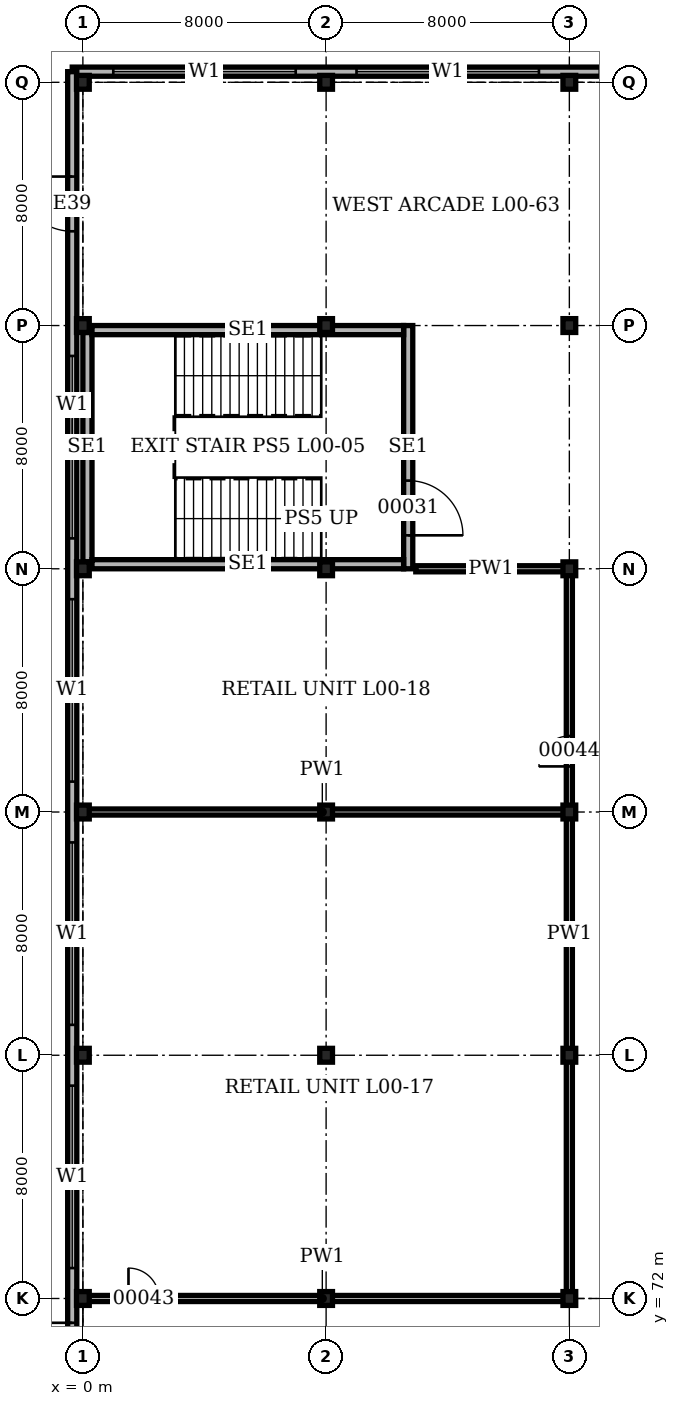
"""IFC4 building model, lengths in metres.
Left out: names, types, materials, properties, quantities, classifications, styles, units other than length and angle.
Written with IfcOpenShell. Run it as: python <this file> out.ifc"""

import sys

from ifc_helpers import new_model, si_unit, direction, frame, frame_2d, origin, origin_2d, place, context, subcontext, project, spatial, rectangle, i_section, extrude, element, fill, save


model = new_model("IFC4")
c1 = context("Model", 3, precision=1e-05, world=origin(), true_north=direction((0.0, 1.0)))
c2 = subcontext(c1, "Body", "Model", "MODEL_VIEW")
j1 = project(units=[si_unit("LENGTHUNIT", "METRE"), si_unit("PLANEANGLEUNIT", "RADIAN")], contexts=[c1])
p1 = place(None, origin())
s1 = spatial("IfcSite", under=j1, at=p1, CompositionType="ELEMENT")
p2 = place(p1, origin())
s2 = spatial("IfcBuilding", under=s1, at=p2, CompositionType="ELEMENT")
p3 = place(p2, origin())
s3 = spatial("IfcBuildingStorey", under=s2, at=p3, CompositionType="ELEMENT", Elevation=0.0)
for number, where, z_axis, x_axis in (
    (1, (0.0, 72.0, 0.0), (0.0, 0.0, 1.0), (1.0, 0.0, 0.0)),
    (2, (0.0, 80.0, 0.0), (0.0, 0.0, 1.0), (1.0, 0.0, 0.0)),
    (3, (0.0, 88.0, 0.0), (0.0, 0.0, 1.0), (1.0, 0.0, 0.0)),
    (4, (0.0, 96.0, 0.0), (0.0, 0.0, 1.0), (1.0, 0.0, 0.0)),
    (5, (0.0, 104.0, 0.0), (0.0, 0.0, 1.0), (1.0, 0.0, 0.0)),
    (6, (0.0, 112.0, 0.0), (0.0, 0.0, 1.0), (1.0, 0.0, 0.0)),
    (7, (8.0, 72.0, 0.0), (0.0, 0.0, 1.0), (1.0, 0.0, 0.0)),
    (8, (8.0, 80.0, 0.0), (0.0, 0.0, 1.0), (1.0, 0.0, 0.0)),
    (9, (8.0, 88.0, 0.0), (0.0, 0.0, 1.0), (1.0, 0.0, 0.0)),
    (10, (8.0, 96.0, 0.0), (0.0, 0.0, 1.0), (1.0, 0.0, 0.0)),
    (11, (8.0, 104.0, 0.0), (0.0, 0.0, 1.0), (1.0, 0.0, 0.0)),
    (12, (8.0, 112.0, 0.0), (0.0, 0.0, 1.0), (1.0, 0.0, 0.0)),
    (13, (16.0, 72.0, 0.0), (0.0, 0.0, 1.0), (1.0, 0.0, 0.0)),
    (14, (16.0, 80.0, 0.0), (0.0, 0.0, 1.0), (1.0, 0.0, 0.0)),
    (15, (16.0, 88.0, 0.0), (0.0, 0.0, 1.0), (1.0, 0.0, 0.0)),
    (16, (16.0, 96.0, 0.0), (0.0, 0.0, 1.0), (1.0, 0.0, 0.0)),
    (17, (16.0, 104.0, 0.0), (0.0, 0.0, 1.0), (1.0, 0.0, 0.0)),
    (18, (16.0, 112.0, 0.0), (0.0, 0.0, 1.0), (1.0, 0.0, 0.0)),
):
    element("IfcColumn", number, at=place(p3, frame(where, z_axis=z_axis, x_axis=x_axis)), inside=s3, PredefinedType="COLUMN", context=c2, shape_type="SweptSolid", body=[
        extrude(i_section(OverallWidth=0.419, OverallDepth=0.455, WebThickness=0.042, FlangeThickness=0.068, at=origin_2d()), origin(), (0.0, 0.0, 1.0), 4.9),
    ])
p4 = place(p3, frame((112.35, 112.35, 0.0), z_axis=(0.0, 0.0, 1.0), x_axis=(-1.0, 0.0, 0.0)))
e19 = element("IfcWall", 19, at=p4, inside=s3, PredefinedType="SOLIDWALL", context=c2, shape_type="SweptSolid", body=[
    extrude(rectangle(XDim=112.7, YDim=0.3, at=frame_2d((56.35, 0.0))), origin(), (0.0, 0.0, 1.0), 4.9),
])
p5 = place(p4, frame((1.35, 0.0, 1.2)))
e20 = element("IfcOpeningElement", 20, at=p5, cuts=e19, PredefinedType="OPENING", context=c2, shape_type="SweptSolid", body=[
    extrude(rectangle(XDim=6.0, YDim=1.5, at=frame_2d((3.0, 0.75))), frame((0.0, 0.16, 0.0), z_axis=(0.0, -1.0, 0.0), x_axis=(1.0, 0.0, 0.0)), (0.0, 0.0, 1.0), 0.32),
])
p6 = place(p4, frame((9.35, 0.0, 1.2)))
e21 = element("IfcOpeningElement", 21, at=p6, cuts=e19, PredefinedType="OPENING", context=c2, shape_type="SweptSolid", body=[
    extrude(rectangle(XDim=6.0, YDim=1.5, at=frame_2d((3.0, 0.75))), frame((0.0, 0.16, 0.0), z_axis=(0.0, -1.0, 0.0), x_axis=(1.0, 0.0, 0.0)), (0.0, 0.0, 1.0), 0.32),
])
p7 = place(p4, frame((17.35, 0.0, 1.2)))
e22 = element("IfcOpeningElement", 22, at=p7, cuts=e19, PredefinedType="OPENING", context=c2, shape_type="SweptSolid", body=[
    extrude(rectangle(XDim=6.0, YDim=1.5, at=frame_2d((3.0, 0.75))), frame((0.0, 0.16, 0.0), z_axis=(0.0, -1.0, 0.0), x_axis=(1.0, 0.0, 0.0)), (0.0, 0.0, 1.0), 0.32),
])
p8 = place(p4, frame((25.35, 0.0, 1.2)))
e23 = element("IfcOpeningElement", 23, at=p8, cuts=e19, PredefinedType="OPENING", context=c2, shape_type="SweptSolid", body=[
    extrude(rectangle(XDim=6.0, YDim=1.5, at=frame_2d((3.0, 0.75))), frame((0.0, 0.16, 0.0), z_axis=(0.0, -1.0, 0.0), x_axis=(1.0, 0.0, 0.0)), (0.0, 0.0, 1.0), 0.32),
])
p9 = place(p4, frame((33.35, 0.0, 1.2)))
e24 = element("IfcOpeningElement", 24, at=p9, cuts=e19, PredefinedType="OPENING", context=c2, shape_type="SweptSolid", body=[
    extrude(rectangle(XDim=6.0, YDim=1.5, at=frame_2d((3.0, 0.75))), frame((0.0, 0.16, 0.0), z_axis=(0.0, -1.0, 0.0), x_axis=(1.0, 0.0, 0.0)), (0.0, 0.0, 1.0), 0.32),
])
p10 = place(p4, frame((41.35, 0.0, 1.2)))
e25 = element("IfcOpeningElement", 25, at=p10, cuts=e19, PredefinedType="OPENING", context=c2, shape_type="SweptSolid", body=[
    extrude(rectangle(XDim=6.0, YDim=1.5, at=frame_2d((3.0, 0.75))), frame((0.0, 0.16, 0.0), z_axis=(0.0, -1.0, 0.0), x_axis=(1.0, 0.0, 0.0)), (0.0, 0.0, 1.0), 0.32),
])
p11 = place(p4, frame((49.35, 0.0, 1.2)))
e26 = element("IfcOpeningElement", 26, at=p11, cuts=e19, PredefinedType="OPENING", context=c2, shape_type="SweptSolid", body=[
    extrude(rectangle(XDim=6.0, YDim=1.5, at=frame_2d((3.0, 0.75))), frame((0.0, 0.16, 0.0), z_axis=(0.0, -1.0, 0.0), x_axis=(1.0, 0.0, 0.0)), (0.0, 0.0, 1.0), 0.32),
])
p12 = place(p4, frame((57.35, 0.0, 1.2)))
e27 = element("IfcOpeningElement", 27, at=p12, cuts=e19, PredefinedType="OPENING", context=c2, shape_type="SweptSolid", body=[
    extrude(rectangle(XDim=6.0, YDim=1.5, at=frame_2d((3.0, 0.75))), frame((0.0, 0.16, 0.0), z_axis=(0.0, -1.0, 0.0), x_axis=(1.0, 0.0, 0.0)), (0.0, 0.0, 1.0), 0.32),
])
p13 = place(p4, frame((65.35, 0.0, 1.2)))
e28 = element("IfcOpeningElement", 28, at=p13, cuts=e19, PredefinedType="OPENING", context=c2, shape_type="SweptSolid", body=[
    extrude(rectangle(XDim=6.0, YDim=1.5, at=frame_2d((3.0, 0.75))), frame((0.0, 0.16, 0.0), z_axis=(0.0, -1.0, 0.0), x_axis=(1.0, 0.0, 0.0)), (0.0, 0.0, 1.0), 0.32),
])
p14 = place(p4, frame((73.35, 0.0, 1.2)))
e29 = element("IfcOpeningElement", 29, at=p14, cuts=e19, PredefinedType="OPENING", context=c2, shape_type="SweptSolid", body=[
    extrude(rectangle(XDim=6.0, YDim=1.5, at=frame_2d((3.0, 0.75))), frame((0.0, 0.16, 0.0), z_axis=(0.0, -1.0, 0.0), x_axis=(1.0, 0.0, 0.0)), (0.0, 0.0, 1.0), 0.32),
])
p15 = place(p4, frame((81.35, 0.0, 1.2)))
e30 = element("IfcOpeningElement", 30, at=p15, cuts=e19, PredefinedType="OPENING", context=c2, shape_type="SweptSolid", body=[
    extrude(rectangle(XDim=6.0, YDim=1.5, at=frame_2d((3.0, 0.75))), frame((0.0, 0.16, 0.0), z_axis=(0.0, -1.0, 0.0), x_axis=(1.0, 0.0, 0.0)), (0.0, 0.0, 1.0), 0.32),
])
p16 = place(p4, frame((89.35, 0.0, 1.2)))
e31 = element("IfcOpeningElement", 31, at=p16, cuts=e19, PredefinedType="OPENING", context=c2, shape_type="SweptSolid", body=[
    extrude(rectangle(XDim=6.0, YDim=1.5, at=frame_2d((3.0, 0.75))), frame((0.0, 0.16, 0.0), z_axis=(0.0, -1.0, 0.0), x_axis=(1.0, 0.0, 0.0)), (0.0, 0.0, 1.0), 0.32),
])
p17 = place(p4, frame((97.35, 0.0, 1.2)))
e32 = element("IfcOpeningElement", 32, at=p17, cuts=e19, PredefinedType="OPENING", context=c2, shape_type="SweptSolid", body=[
    extrude(rectangle(XDim=6.0, YDim=1.5, at=frame_2d((3.0, 0.75))), frame((0.0, 0.16, 0.0), z_axis=(0.0, -1.0, 0.0), x_axis=(1.0, 0.0, 0.0)), (0.0, 0.0, 1.0), 0.32),
])
p18 = place(p4, frame((105.35, 0.0, 1.2)))
e33 = element("IfcOpeningElement", 33, at=p18, cuts=e19, PredefinedType="OPENING", context=c2, shape_type="SweptSolid", body=[
    extrude(rectangle(XDim=6.0, YDim=1.5, at=frame_2d((3.0, 0.75))), frame((0.0, 0.16, 0.0), z_axis=(0.0, -1.0, 0.0), x_axis=(1.0, 0.0, 0.0)), (0.0, 0.0, 1.0), 0.32),
])
p19 = place(p3, frame((-0.35, 112.35, 0.0), z_axis=(0.0, 0.0, 1.0), x_axis=(0.0, -1.0, 0.0)))
e34 = element("IfcWall", 34, at=p19, inside=s3, PredefinedType="SOLIDWALL", context=c2, shape_type="SweptSolid", body=[
    extrude(rectangle(XDim=112.7, YDim=0.3, at=frame_2d((56.35, 0.0))), origin(), (0.0, 0.0, 1.0), 4.9),
])
p20 = place(p19, frame((3.45, 0.0, 0.0)))
e35 = element("IfcOpeningElement", 35, at=p20, cuts=e34, PredefinedType="OPENING", context=c2, shape_type="SweptSolid", body=[
    extrude(rectangle(XDim=1.8, YDim=2.4, at=frame_2d((0.9, 1.2))), frame((0.0, 0.16, 0.0), z_axis=(0.0, -1.0, 0.0), x_axis=(1.0, 0.0, 0.0)), (0.0, 0.0, 1.0), 0.32),
])
p21 = place(p19, frame((9.35, 0.0, 1.2)))
e36 = element("IfcOpeningElement", 36, at=p21, cuts=e34, PredefinedType="OPENING", context=c2, shape_type="SweptSolid", body=[
    extrude(rectangle(XDim=6.0, YDim=1.5, at=frame_2d((3.0, 0.75))), frame((0.0, 0.16, 0.0), z_axis=(0.0, -1.0, 0.0), x_axis=(1.0, 0.0, 0.0)), (0.0, 0.0, 1.0), 0.32),
])
p22 = place(p19, frame((17.35, 0.0, 1.2)))
e37 = element("IfcOpeningElement", 37, at=p22, cuts=e34, PredefinedType="OPENING", context=c2, shape_type="SweptSolid", body=[
    extrude(rectangle(XDim=6.0, YDim=1.5, at=frame_2d((3.0, 0.75))), frame((0.0, 0.16, 0.0), z_axis=(0.0, -1.0, 0.0), x_axis=(1.0, 0.0, 0.0)), (0.0, 0.0, 1.0), 0.32),
])
p23 = place(p19, frame((25.35, 0.0, 1.2)))
e38 = element("IfcOpeningElement", 38, at=p23, cuts=e34, PredefinedType="OPENING", context=c2, shape_type="SweptSolid", body=[
    extrude(rectangle(XDim=6.0, YDim=1.5, at=frame_2d((3.0, 0.75))), frame((0.0, 0.16, 0.0), z_axis=(0.0, -1.0, 0.0), x_axis=(1.0, 0.0, 0.0)), (0.0, 0.0, 1.0), 0.32),
])
p24 = place(p19, frame((33.35, 0.0, 1.2)))
e39 = element("IfcOpeningElement", 39, at=p24, cuts=e34, PredefinedType="OPENING", context=c2, shape_type="SweptSolid", body=[
    extrude(rectangle(XDim=6.0, YDim=1.5, at=frame_2d((3.0, 0.75))), frame((0.0, 0.16, 0.0), z_axis=(0.0, -1.0, 0.0), x_axis=(1.0, 0.0, 0.0)), (0.0, 0.0, 1.0), 0.32),
])
p25 = place(p19, frame((41.15, 0.0, 0.0)))
e40 = element("IfcOpeningElement", 40, at=p25, cuts=e34, PredefinedType="OPENING", context=c2, shape_type="SweptSolid", body=[
    extrude(rectangle(XDim=2.4, YDim=3.0, at=frame_2d((1.2, 1.5))), frame((0.0, 0.16, 0.0), z_axis=(0.0, -1.0, 0.0), x_axis=(1.0, 0.0, 0.0)), (0.0, 0.0, 1.0), 0.32),
])
p26 = place(p19, frame((45.15, 0.0, 0.0)))
e41 = element("IfcOpeningElement", 41, at=p26, cuts=e34, PredefinedType="OPENING", context=c2, shape_type="SweptSolid", body=[
    extrude(rectangle(XDim=2.4, YDim=3.0, at=frame_2d((1.2, 1.5))), frame((0.0, 0.16, 0.0), z_axis=(0.0, -1.0, 0.0), x_axis=(1.0, 0.0, 0.0)), (0.0, 0.0, 1.0), 0.32),
])
p27 = place(p19, frame((49.35, 0.0, 1.2)))
e42 = element("IfcOpeningElement", 42, at=p27, cuts=e34, PredefinedType="OPENING", context=c2, shape_type="SweptSolid", body=[
    extrude(rectangle(XDim=6.0, YDim=1.5, at=frame_2d((3.0, 0.75))), frame((0.0, 0.16, 0.0), z_axis=(0.0, -1.0, 0.0), x_axis=(1.0, 0.0, 0.0)), (0.0, 0.0, 1.0), 0.32),
])
p28 = place(p19, frame((57.45, 0.0, 0.0)))
e43 = element("IfcOpeningElement", 43, at=p28, cuts=e34, PredefinedType="OPENING", context=c2, shape_type="SweptSolid", body=[
    extrude(rectangle(XDim=1.8, YDim=2.4, at=frame_2d((0.9, 1.2))), frame((0.0, 0.16, 0.0), z_axis=(0.0, -1.0, 0.0), x_axis=(1.0, 0.0, 0.0)), (0.0, 0.0, 1.0), 0.32),
])
p29 = place(p19, frame((61.45, 0.0, 0.0)))
e44 = element("IfcOpeningElement", 44, at=p29, cuts=e34, PredefinedType="OPENING", context=c2, shape_type="SweptSolid", body=[
    extrude(rectangle(XDim=1.8, YDim=2.4, at=frame_2d((0.9, 1.2))), frame((0.0, 0.16, 0.0), z_axis=(0.0, -1.0, 0.0), x_axis=(1.0, 0.0, 0.0)), (0.0, 0.0, 1.0), 0.32),
])
p30 = place(p19, frame((65.35, 0.0, 1.2)))
e45 = element("IfcOpeningElement", 45, at=p30, cuts=e34, PredefinedType="OPENING", context=c2, shape_type="SweptSolid", body=[
    extrude(rectangle(XDim=6.0, YDim=1.5, at=frame_2d((3.0, 0.75))), frame((0.0, 0.16, 0.0), z_axis=(0.0, -1.0, 0.0), x_axis=(1.0, 0.0, 0.0)), (0.0, 0.0, 1.0), 0.32),
])
p31 = place(p19, frame((73.35, 0.0, 1.2)))
e46 = element("IfcOpeningElement", 46, at=p31, cuts=e34, PredefinedType="OPENING", context=c2, shape_type="SweptSolid", body=[
    extrude(rectangle(XDim=6.0, YDim=1.5, at=frame_2d((3.0, 0.75))), frame((0.0, 0.16, 0.0), z_axis=(0.0, -1.0, 0.0), x_axis=(1.0, 0.0, 0.0)), (0.0, 0.0, 1.0), 0.32),
])
p32 = place(p19, frame((81.35, 0.0, 1.2)))
e47 = element("IfcOpeningElement", 47, at=p32, cuts=e34, PredefinedType="OPENING", context=c2, shape_type="SweptSolid", body=[
    extrude(rectangle(XDim=6.0, YDim=1.5, at=frame_2d((3.0, 0.75))), frame((0.0, 0.16, 0.0), z_axis=(0.0, -1.0, 0.0), x_axis=(1.0, 0.0, 0.0)), (0.0, 0.0, 1.0), 0.32),
])
p33 = place(p19, frame((89.35, 0.0, 1.2)))
e48 = element("IfcOpeningElement", 48, at=p33, cuts=e34, PredefinedType="OPENING", context=c2, shape_type="SweptSolid", body=[
    extrude(rectangle(XDim=6.0, YDim=1.5, at=frame_2d((3.0, 0.75))), frame((0.0, 0.16, 0.0), z_axis=(0.0, -1.0, 0.0), x_axis=(1.0, 0.0, 0.0)), (0.0, 0.0, 1.0), 0.32),
])
p34 = place(p19, frame((99.45, 0.0, 0.0)))
e49 = element("IfcOpeningElement", 49, at=p34, cuts=e34, PredefinedType="OPENING", context=c2, shape_type="SweptSolid", body=[
    extrude(rectangle(XDim=1.8, YDim=2.4, at=frame_2d((0.9, 1.2))), frame((0.0, 0.16, 0.0), z_axis=(0.0, -1.0, 0.0), x_axis=(1.0, 0.0, 0.0)), (0.0, 0.0, 1.0), 0.32),
])
p35 = place(p19, frame((107.45, 0.0, 0.0)))
e50 = element("IfcOpeningElement", 50, at=p35, cuts=e34, PredefinedType="OPENING", context=c2, shape_type="SweptSolid", body=[
    extrude(rectangle(XDim=1.8, YDim=2.4, at=frame_2d((0.9, 1.2))), frame((0.0, 0.16, 0.0), z_axis=(0.0, -1.0, 0.0), x_axis=(1.0, 0.0, 0.0)), (0.0, 0.0, 1.0), 0.32),
])
p36 = place(p3, frame((0.15, 96.227, 0.0), z_axis=(0.0, 0.0, 1.0), x_axis=(0.0, 1.0, 0.0)))
e51 = element("IfcWall", 51, at=p36, inside=s3, PredefinedType="SOLIDWALL", context=c2, shape_type="SweptSolid", body=[
    extrude(rectangle(XDim=7.545, YDim=0.3, at=frame_2d((3.773, 0.0))), origin(), (0.0, 0.0, 1.0), 4.7),
])
p37 = place(p3, frame((10.7, 96.0, 0.0), z_axis=(0.0, 0.0, 1.0), x_axis=(0.0, 1.0, 0.0)))
e52 = element("IfcWall", 52, at=p37, inside=s3, PredefinedType="SOLIDWALL", context=c2, shape_type="SweptSolid", body=[
    extrude(rectangle(XDim=8.0, YDim=0.3, at=frame_2d((4.0, 0.0))), origin(), (0.0, 0.0, 1.0), 4.7),
])
p38 = place(p37, frame((1.1, 0.0, 0.0)))
e53 = element("IfcOpeningElement", 53, at=p38, cuts=e52, PredefinedType="OPENING", context=c2, shape_type="SweptSolid", body=[
    extrude(rectangle(XDim=1.8, YDim=2.1, at=frame_2d((0.9, 1.05))), frame((0.0, 0.16, 0.0), z_axis=(0.0, -1.0, 0.0), x_axis=(1.0, 0.0, 0.0)), (0.0, 0.0, 1.0), 0.32),
])
for number, where, z_axis, x_axis in (
    (54, (0.3, 96.15, 0.0), (0.0, 0.0, 1.0), (1.0, 0.0, 0.0)),
    (55, (0.3, 103.85, 0.0), (0.0, 0.0, 1.0), (1.0, 0.0, 0.0)),
):
    element("IfcWall", number, at=place(p3, frame(where, z_axis=z_axis, x_axis=x_axis)), inside=s3, PredefinedType="SOLIDWALL", context=c2, shape_type="SweptSolid", body=[
        extrude(rectangle(XDim=10.25, YDim=0.3, at=frame_2d((5.125, 0.0))), origin(), (0.0, 0.0, 1.0), 4.7),
    ])
p39 = place(p3, frame((-0.15, 72.0, 0.0), z_axis=(0.0, 0.0, 1.0), x_axis=(1.0, 0.0, 0.0)))
e56 = element("IfcWall", 56, at=p39, inside=s3, PredefinedType="PARTITIONING", context=c2, shape_type="SweptSolid", body=[
    extrude(rectangle(XDim=16.05, YDim=0.2, at=frame_2d((8.025, 0.0))), origin(), (0.0, 0.0, 1.0), 3.928),
])
p40 = place(p39, frame((1.65, 0.0, 0.0)))
e57 = element("IfcOpeningElement", 57, at=p40, cuts=e56, PredefinedType="OPENING", context=c2, shape_type="SweptSolid", body=[
    extrude(rectangle(XDim=1.0, YDim=2.1, at=frame_2d((0.5, 1.05))), frame((0.0, 0.11, 0.0), z_axis=(0.0, -1.0, 0.0), x_axis=(1.0, 0.0, 0.0)), (0.0, 0.0, 1.0), 0.22),
])
p41 = place(p3, frame((-0.15, 88.0, 0.0), z_axis=(0.0, 0.0, 1.0), x_axis=(1.0, 0.0, 0.0)))
e58 = element("IfcWall", 58, at=p41, inside=s3, PredefinedType="PARTITIONING", context=c2, shape_type="SweptSolid", body=[
    extrude(rectangle(XDim=16.05, YDim=0.2, at=frame_2d((8.025, 0.0))), origin(), (0.0, 0.0, 1.0), 3.928),
])
p42 = place(p3, frame((10.95, 96.0, 0.0), z_axis=(0.0, 0.0, 1.0), x_axis=(1.0, 0.0, 0.0)))
e59 = element("IfcWall", 59, at=p42, inside=s3, PredefinedType="PARTITIONING", context=c2, shape_type="SweptSolid", body=[
    extrude(rectangle(XDim=4.95, YDim=0.2, at=frame_2d((2.475, 0.0))), origin(), (0.0, 0.0, 1.0), 3.928),
])
p43 = place(p3, frame((16.0, 72.1, 0.0), z_axis=(0.0, 0.0, 1.0), x_axis=(0.0, 1.0, 0.0)))
e60 = element("IfcWall", 60, at=p43, inside=s3, PredefinedType="PARTITIONING", context=c2, shape_type="SweptSolid", body=[
    extrude(rectangle(XDim=23.8, YDim=0.2, at=frame_2d((11.9, 0.0))), origin(), (0.0, 0.0, 1.0), 3.928),
])
p44 = place(p43, frame((17.4, 0.0, 0.0)))
e61 = element("IfcOpeningElement", 61, at=p44, cuts=e60, PredefinedType="OPENING", context=c2, shape_type="SweptSolid", body=[
    extrude(rectangle(XDim=1.0, YDim=2.1, at=frame_2d((0.5, 1.05))), frame((0.0, 0.11, 0.0), z_axis=(0.0, -1.0, 0.0), x_axis=(1.0, 0.0, 0.0)), (0.0, 0.0, 1.0), 0.22),
])
p45 = place(p17, origin())
e62 = element("IfcWindow", 62, at=p45, inside=s3, PartitioningType="SINGLE_PANEL", PredefinedType="WINDOW", context=c2, shape_type="SweptSolid", body=[
    extrude(rectangle(XDim=6.0, YDim=1.5, at=frame_2d((3.0, 0.75))), frame((0.0, 0.03, 0.0), z_axis=(0.0, -1.0, 0.0), x_axis=(1.0, 0.0, 0.0)), (0.0, 0.0, 1.0), 0.06),
])
fill(e32, e62)
p46 = place(p18, origin())
e63 = element("IfcWindow", 63, at=p46, inside=s3, PartitioningType="SINGLE_PANEL", PredefinedType="WINDOW", context=c2, shape_type="SweptSolid", body=[
    extrude(rectangle(XDim=6.0, YDim=1.5, at=frame_2d((3.0, 0.75))), frame((0.0, 0.03, 0.0), z_axis=(0.0, -1.0, 0.0), x_axis=(1.0, 0.0, 0.0)), (0.0, 0.0, 1.0), 0.06),
])
fill(e33, e63)
p47 = place(p20, frame((1.8, 0.0, 0.0), z_axis=(0.0, 0.0, 1.0), x_axis=(-1.0, 0.0, 0.0)))
e64 = element("IfcDoor", 64, at=p47, inside=s3, OperationType="DOUBLE_DOOR_SINGLE_SWING", PredefinedType="DOOR", context=c2, shape_type="SweptSolid", body=[
    extrude(rectangle(XDim=1.8, YDim=2.4, at=frame_2d((0.9, 1.2))), frame((0.0, 0.15, 0.0), z_axis=(0.0, -1.0, 0.0), x_axis=(1.0, 0.0, 0.0)), (0.0, 0.0, 1.0), 0.3),
])
fill(e35, e64)
p48 = place(p21, origin())
e65 = element("IfcWindow", 65, at=p48, inside=s3, PartitioningType="SINGLE_PANEL", PredefinedType="WINDOW", context=c2, shape_type="SweptSolid", body=[
    extrude(rectangle(XDim=6.0, YDim=1.5, at=frame_2d((3.0, 0.75))), frame((0.0, 0.03, 0.0), z_axis=(0.0, -1.0, 0.0), x_axis=(1.0, 0.0, 0.0)), (0.0, 0.0, 1.0), 0.06),
])
fill(e36, e65)
p49 = place(p22, origin())
e66 = element("IfcWindow", 66, at=p49, inside=s3, PartitioningType="SINGLE_PANEL", PredefinedType="WINDOW", context=c2, shape_type="SweptSolid", body=[
    extrude(rectangle(XDim=6.0, YDim=1.5, at=frame_2d((3.0, 0.75))), frame((0.0, 0.03, 0.0), z_axis=(0.0, -1.0, 0.0), x_axis=(1.0, 0.0, 0.0)), (0.0, 0.0, 1.0), 0.06),
])
fill(e37, e66)
p50 = place(p23, origin())
e67 = element("IfcWindow", 67, at=p50, inside=s3, PartitioningType="SINGLE_PANEL", PredefinedType="WINDOW", context=c2, shape_type="SweptSolid", body=[
    extrude(rectangle(XDim=6.0, YDim=1.5, at=frame_2d((3.0, 0.75))), frame((0.0, 0.03, 0.0), z_axis=(0.0, -1.0, 0.0), x_axis=(1.0, 0.0, 0.0)), (0.0, 0.0, 1.0), 0.06),
])
fill(e38, e67)
p51 = place(p24, origin())
e68 = element("IfcWindow", 68, at=p51, inside=s3, PartitioningType="SINGLE_PANEL", PredefinedType="WINDOW", context=c2, shape_type="SweptSolid", body=[
    extrude(rectangle(XDim=6.0, YDim=1.5, at=frame_2d((3.0, 0.75))), frame((0.0, 0.03, 0.0), z_axis=(0.0, -1.0, 0.0), x_axis=(1.0, 0.0, 0.0)), (0.0, 0.0, 1.0), 0.06),
])
fill(e39, e68)
p52 = place(p25, frame((2.4, 0.0, 0.0), z_axis=(0.0, 0.0, 1.0), x_axis=(-1.0, 0.0, 0.0)))
e69 = element("IfcDoor", 69, at=p52, inside=s3, OperationType="DOUBLE_DOOR_DOUBLE_SWING", PredefinedType="DOOR", context=c2, shape_type="SweptSolid", body=[
    extrude(rectangle(XDim=2.4, YDim=3.0, at=frame_2d((1.2, 1.5))), frame((0.0, 0.15, 0.0), z_axis=(0.0, -1.0, 0.0), x_axis=(1.0, 0.0, 0.0)), (0.0, 0.0, 1.0), 0.3),
])
fill(e40, e69)
p53 = place(p38, frame((1.8, 0.0, 0.0), z_axis=(0.0, 0.0, 1.0), x_axis=(-1.0, 0.0, 0.0)))
e70 = element("IfcDoor", 70, at=p53, inside=s3, OperationType="DOUBLE_DOOR_SINGLE_SWING", PredefinedType="DOOR", context=c2, shape_type="SweptSolid", body=[
    extrude(rectangle(XDim=1.8, YDim=2.1, at=frame_2d((0.9, 1.05))), frame((0.0, 0.15, 0.0), z_axis=(0.0, -1.0, 0.0), x_axis=(1.0, 0.0, 0.0)), (0.0, 0.0, 1.0), 0.3),
])
fill(e53, e70)
p54 = place(p40, origin())
e71 = element("IfcDoor", 71, at=p54, inside=s3, OperationType="SINGLE_SWING_LEFT", PredefinedType="DOOR", context=c2, shape_type="SweptSolid", body=[
    extrude(rectangle(XDim=1.0, YDim=2.1, at=frame_2d((0.5, 1.05))), frame((0.0, 0.1, 0.0), z_axis=(0.0, -1.0, 0.0), x_axis=(1.0, 0.0, 0.0)), (0.0, 0.0, 1.0), 0.199),
])
fill(e57, e71)
p55 = place(p44, origin())
e72 = element("IfcDoor", 72, at=p55, inside=s3, OperationType="SINGLE_SWING_LEFT", PredefinedType="DOOR", context=c2, shape_type="SweptSolid", body=[
    extrude(rectangle(XDim=1.0, YDim=2.1, at=frame_2d((0.5, 1.05))), frame((0.0, 0.1, 0.0), z_axis=(0.0, -1.0, 0.0), x_axis=(1.0, 0.0, 0.0)), (0.0, 0.0, 1.0), 0.199),
])
fill(e61, e72)
save(model, sys.argv[1])
